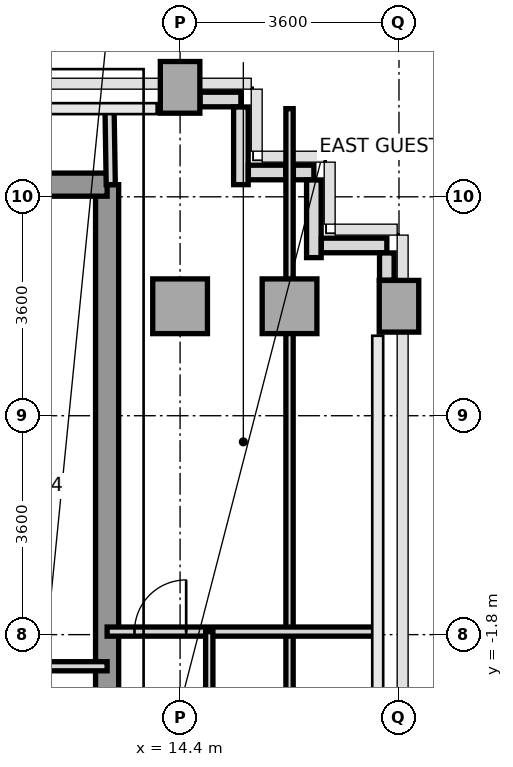
"""IFC4 building model, lengths in metres.
Left out: names, types, materials, properties, quantities, classifications, styles, units other than length and angle.
Written with IfcOpenShell. Run it as: python <this file> out.ifc"""

import sys

from ifc_helpers import new_model, si_unit, direction, frame, frame_2d, origin, origin_2d, place, context, subcontext, project, spatial, rectangle, extrude, source, transform, mapped, element, fill, save


model = new_model("IFC4")
c1 = context("Model", 3, precision=1e-05, world=origin(), true_north=direction((0.0, 1.0)))
c2 = subcontext(c1, "Body", "Model", "MODEL_VIEW")
j1 = project(units=[si_unit("LENGTHUNIT", "METRE"), si_unit("PLANEANGLEUNIT", "RADIAN")], contexts=[c1])
p1 = place(None, origin())
s1 = spatial("IfcSite", under=j1, at=p1, CompositionType="ELEMENT")
p2 = place(p1, origin())
s2 = spatial("IfcBuilding", under=s1, at=p2, CompositionType="ELEMENT")
p3 = place(p2, frame((0.0, 0.0, 187.6)))
s3 = spatial("IfcBuildingStorey", under=s2, at=p3, CompositionType="ELEMENT", Elevation=187.6)
m1 = source(origin(), c2, "Body", "SweptSolid", [
    extrude(rectangle(XDim=0.9, YDim=0.9, at=origin_2d()), origin(), (0.0, 0.0, 1.0), 3.2),
])
p4 = place(p3, frame((14.4, 3.6, 0.0), z_axis=(0.0, 0.0, 1.0), x_axis=(1.0, 0.0, 0.0)))
e1 = element("IfcColumn", 1, at=p4, inside=s3, PredefinedType="COLUMN", context=c2, shape_type="MappedRepresentation", body=[
    mapped(m1, transform((0.0, 0.0, 0.0), x_axis=(1.0, 0.0, 0.0), y_axis=(0.0, 1.0, 0.0), z_axis=(0.0, 0.0, 1.0), scale=1.0)),
])
m2 = source(origin(), c2, "Body", "SweptSolid", [
    extrude(rectangle(XDim=0.65, YDim=0.85, at=origin_2d()), origin(), (0.0, 0.0, 1.0), 3.2),
])
p5 = place(p3, frame((14.4, 7.2, 0.0), z_axis=(0.0, 0.0, 1.0), x_axis=(1.0, 0.0, 0.0)))
e2 = element("IfcColumn", 2, at=p5, inside=s3, PredefinedType="COLUMN", context=c2, shape_type="MappedRepresentation", body=[
    mapped(m2, transform((0.0, 0.0, 0.0), x_axis=(1.0, 0.0, 0.0), y_axis=(0.0, 1.0, 0.0), z_axis=(0.0, 0.0, 1.0), scale=1.0)),
])
p6 = place(p3, frame((16.2, 3.6, 0.0), z_axis=(0.0, 0.0, 1.0), x_axis=(1.0, 0.0, 0.0)))
e3 = element("IfcColumn", 3, at=p6, inside=s3, PredefinedType="COLUMN", context=c2, shape_type="MappedRepresentation", body=[
    mapped(m1, transform((0.0, 0.0, 0.0), x_axis=(1.0, 0.0, 0.0), y_axis=(0.0, 1.0, 0.0), z_axis=(0.0, 0.0, 1.0), scale=1.0)),
])
p7 = place(p3, frame((18.0, 3.6, 0.0), z_axis=(0.0, 0.0, 1.0), x_axis=(1.0, 0.0, 0.0)))
e4 = element("IfcColumn", 4, at=p7, inside=s3, PredefinedType="COLUMN", context=c2, shape_type="MappedRepresentation", body=[
    mapped(m2, transform((0.0, 0.0, 0.0), x_axis=(1.0, 0.0, 0.0), y_axis=(0.0, 1.0, 0.0), z_axis=(0.0, 0.0, 1.0), scale=1.0)),
])
p8 = place(p3, frame((14.728, 7.0, 0.0), z_axis=(0.0, 0.0, 1.0), x_axis=(1.0, 0.0, 0.0)))
e5 = element("IfcWall", 5, at=p8, inside=s3, PredefinedType="PARAPET", context=c2, shape_type="SweptSolid", body=[
    extrude(rectangle(XDim=0.672, YDim=0.24, at=frame_2d((0.336, 0.0))), origin(), (0.0, 0.0, 1.0), 1.15),
])
p9 = place(p3, frame((15.4, 6.877, 0.0), z_axis=(0.0, 0.0, 1.0), x_axis=(0.0, -1.0, 0.0)))
e6 = element("IfcWall", 6, at=p9, inside=s3, PredefinedType="PARAPET", context=c2, shape_type="SweptSolid", body=[
    extrude(rectangle(XDim=1.277, YDim=0.24, at=frame_2d((0.638, 0.0))), origin(), (0.0, 0.0, 1.0), 1.15),
])
p10 = place(p3, frame((15.523, 5.8, 0.0), z_axis=(0.0, 0.0, 1.0), x_axis=(1.0, 0.0, 0.0)))
e7 = element("IfcWall", 7, at=p10, inside=s3, PredefinedType="PARAPET", context=c2, shape_type="SweptSolid", body=[
    extrude(rectangle(XDim=0.614, YDim=0.24, at=frame_2d((0.307, 0.0))), origin(), (0.0, 0.0, 1.0), 1.15),
])
p11 = place(p3, frame((16.263, 5.8, 0.0), z_axis=(0.0, 0.0, 1.0), x_axis=(1.0, 0.0, 0.0)))
e8 = element("IfcWall", 8, at=p11, inside=s3, PredefinedType="PARAPET", context=c2, shape_type="SweptSolid", body=[
    extrude(rectangle(XDim=0.337, YDim=0.24, at=frame_2d((0.168, 0.0))), origin(), (0.0, 0.0, 1.0), 1.15),
])
p12 = place(p3, frame((16.6, 5.677, 0.0), z_axis=(0.0, 0.0, 1.0), x_axis=(0.0, -1.0, 0.0)))
e9 = element("IfcWall", 9, at=p12, inside=s3, PredefinedType="PARAPET", context=c2, shape_type="SweptSolid", body=[
    extrude(rectangle(XDim=1.277, YDim=0.24, at=frame_2d((0.639, 0.0))), origin(), (0.0, 0.0, 1.0), 1.15),
])
p13 = place(p3, frame((16.723, 4.6, 0.0), z_axis=(0.0, 0.0, 1.0), x_axis=(1.0, 0.0, 0.0)))
e10 = element("IfcWall", 10, at=p13, inside=s3, PredefinedType="PARAPET", context=c2, shape_type="SweptSolid", body=[
    extrude(rectangle(XDim=1.077, YDim=0.24, at=frame_2d((0.539, 0.0))), origin(), (0.0, 0.0, 1.0), 1.15),
])
p14 = place(p3, frame((17.8, 4.477, 0.0), z_axis=(0.0, 0.0, 1.0), x_axis=(0.0, -1.0, 0.0)))
e11 = element("IfcWall", 11, at=p14, inside=s3, PredefinedType="PARAPET", context=c2, shape_type="SweptSolid", body=[
    extrude(rectangle(XDim=0.449, YDim=0.24, at=frame_2d((0.225, 0.0))), origin(), (0.0, 0.0, 1.0), 1.15),
])
p15 = place(p3, frame((13.2, -5.6, 0.0), z_axis=(0.0, 0.0, 1.0), x_axis=(0.0, 1.0, 0.0)))
e12 = element("IfcWall", 12, at=p15, inside=s3, PredefinedType="SHEAR", context=c2, shape_type="SweptSolid", body=[
    extrude(rectangle(XDim=11.2, YDim=0.38, at=frame_2d((5.6, 0.0))), origin(), (0.0, 0.0, 1.0), 3.2),
])
p16 = place(p3, frame((11.356, 5.6, 0.0), z_axis=(0.0, 0.0, 1.0), x_axis=(1.0, 0.0, 0.0)))
e13 = element("IfcWall", 13, at=p16, inside=s3, PredefinedType="SHEAR", context=c2, shape_type="SweptSolid", body=[
    extrude(rectangle(XDim=1.844, YDim=0.38, at=frame_2d((0.922, 0.0))), origin(), (0.0, 0.0, 1.0), 3.2),
])
p17 = place(p3, frame((11.02, -2.32, 0.0), z_axis=(0.0, 0.0, 1.0), x_axis=(1.0, 0.0, 0.0)))
e14 = element("IfcWall", 14, at=p17, inside=s3, PredefinedType="PARTITIONING", context=c2, shape_type="SweptSolid", body=[
    extrude(rectangle(XDim=2.18, YDim=0.15, at=frame_2d((1.09, 0.0))), origin(), (0.0, 0.0, 1.0), 3.2),
])
p18 = place(p3, frame((13.26, 5.6, 0.0), z_axis=(0.0, 0.0, 1.0), x_axis=(-0.016013571389, 0.999871774545, 0.0)))
e15 = element("IfcWall", 15, at=p18, inside=s3, PredefinedType="PARTITIONING", context=c2, shape_type="SweptSolid", body=[
    extrude(rectangle(XDim=1.25, YDim=0.15, at=frame_2d((0.625, 0.0))), origin(), (0.0, 0.0, 1.0), 3.2),
])
p19 = place(p3, frame((16.2, -6.85, 0.0), z_axis=(0.0, 0.0, 1.0), x_axis=(0.0, 1.0, 0.0)))
e16 = element("IfcWall", 16, at=p19, inside=s3, PredefinedType="PARTITIONING", context=c2, shape_type="SweptSolid", body=[
    extrude(rectangle(XDim=13.7, YDim=0.12, at=frame_2d((6.85, 0.0))), origin(), (0.0, 0.0, 1.0), 2.8),
])
p20 = place(p3, frame((13.2, -1.75, 0.0), z_axis=(0.0, 0.0, 1.0), x_axis=(1.0, 0.0, 0.0)))
e17 = element("IfcWall", 17, at=p20, inside=s3, PredefinedType="PARTITIONING", context=c2, shape_type="SweptSolid", body=[
    extrude(rectangle(XDim=4.45, YDim=0.15, at=frame_2d((2.225, 0.0))), origin(), (0.0, 0.0, 1.0), 2.8),
])
p21 = place(p20, frame((0.45, 0.0, 0.0)))
e18 = element("IfcOpeningElement", 18, at=p21, cuts=e17, PredefinedType="OPENING", context=c2, shape_type="SweptSolid", body=[
    extrude(rectangle(XDim=0.85, YDim=2.1, at=frame_2d((0.425, 1.05))), frame((0.0, 0.085, 0.0), z_axis=(0.0, -1.0, 0.0), x_axis=(1.0, 0.0, 0.0)), (0.0, 0.0, 1.0), 0.17),
])
p22 = place(p3, frame((14.88, -6.85, 0.0), z_axis=(0.0, 0.0, 1.0), x_axis=(0.0, 1.0, 0.0)))
e19 = element("IfcWall", 19, at=p22, inside=s3, PredefinedType="PARTITIONING", context=c2, shape_type="SweptSolid", body=[
    extrude(rectangle(XDim=5.1, YDim=0.12, at=frame_2d((2.55, 0.0))), origin(), (0.0, 0.0, 1.0), 3.2),
])
p23 = place(p22, frame((1.2, 0.0, 0.0)))
e20 = element("IfcOpeningElement", 20, at=p23, cuts=e19, PredefinedType="OPENING", context=c2, shape_type="SweptSolid", body=[
    extrude(rectangle(XDim=0.95, YDim=2.15, at=frame_2d((0.475, 1.075))), frame((0.0, 0.07, 0.0), z_axis=(0.0, -1.0, 0.0), x_axis=(1.0, 0.0, 0.0)), (0.0, 0.0, 1.0), 0.14),
])
m3 = source(origin(), c2, "Body", "SweptSolid", [
    extrude(rectangle(XDim=0.85, YDim=2.1, at=frame_2d((0.425, 1.05))), frame((0.0, 0.025, 0.0), z_axis=(0.0, -1.0, 0.0), x_axis=(1.0, 0.0, 0.0)), (0.0, 0.0, 1.0), 0.05),
])
p24 = place(p21, origin())
e21 = element("IfcDoor", 21, at=p24, inside=s3, OperationType="SINGLE_SWING_RIGHT", PredefinedType="DOOR", context=c2, shape_type="MappedRepresentation", body=[
    mapped(m3, transform((0.0, 0.0, 0.0), x_axis=(1.0, 0.0, 0.0), y_axis=(0.0, 1.0, 0.0), z_axis=(0.0, 0.0, 1.0), scale=1.0)),
])
fill(e18, e21)
save(model, sys.argv[1])
